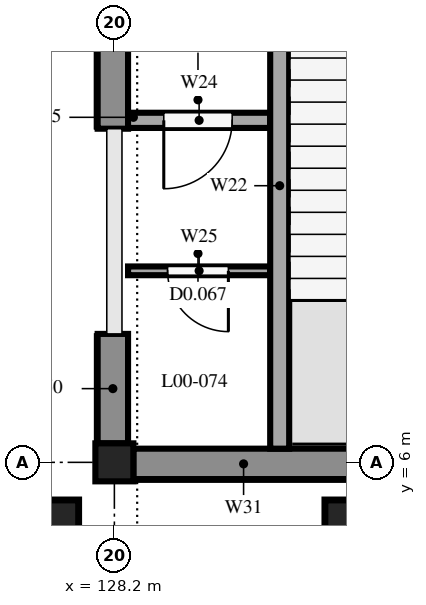
"""IFC4 building model, lengths in metres.
Left out: names, types, materials, properties, quantities, classifications, styles, units other than length and angle.
Written with IfcOpenShell. Run it as: python <this file> out.ifc"""

import sys

from ifc_helpers import new_model, si_unit, direction, frame, frame_2d, origin, origin_2d, place, context, subcontext, project, spatial, rectangle, extrude, element, fill, save


model = new_model("IFC4")
c1 = context("Model", 3, precision=1e-05, world=origin(), true_north=direction((0.0, 1.0)))
c2 = subcontext(c1, "Body", "Model", "MODEL_VIEW")
j1 = project(units=[si_unit("LENGTHUNIT", "METRE"), si_unit("PLANEANGLEUNIT", "RADIAN")], contexts=[c1])
p1 = place(None, origin())
s1 = spatial("IfcSite", under=j1, at=p1, CompositionType="ELEMENT")
p2 = place(p1, origin())
s2 = spatial("IfcBuilding", under=s1, at=p2, CompositionType="ELEMENT")
p3 = place(p2, origin())
s3 = spatial("IfcBuildingStorey", under=s2, at=p3, CompositionType="ELEMENT", Elevation=0.0)
p4 = place(p3, frame((128.2, 6.0, 0.0), z_axis=(0.0, 0.0, 1.0), x_axis=(1.0, 0.0, 0.0)))
e1 = element("IfcColumn", 1, at=p4, inside=s3, PredefinedType="COLUMN", context=c2, shape_type="SweptSolid", body=[
    extrude(rectangle(XDim=0.5, YDim=0.5, at=origin_2d()), origin(), (0.0, 0.0, 1.0), 4.25),
])
for number, where, z_axis, x_axis in (
    (2, (127.5, 5.275, -0.3), (0.0, 0.0, 1.0), (1.0, 0.0, 0.0)),
    (3, (131.2, 5.275, -0.3), (0.0, 0.0, 1.0), (1.0, 0.0, 0.0)),
):
    element("IfcColumn", number, at=place(p3, frame(where, z_axis=z_axis, x_axis=x_axis)), inside=s3, PredefinedType="COLUMN", context=c2, shape_type="SweptSolid", body=[
        extrude(rectangle(XDim=0.45, YDim=0.45, at=origin_2d()), origin(), (0.0, 0.0, 1.0), 3.95),
    ])
p5 = place(p3, frame((128.18, 6.25, 0.0), z_axis=(0.0, 0.0, 1.0), x_axis=(0.0, 1.0, 0.0)))
e4 = element("IfcWall", 4, at=p5, inside=s3, PredefinedType="STANDARD", context=c2, shape_type="SweptSolid", body=[
    extrude(rectangle(XDim=1.44, YDim=0.4, at=frame_2d((0.72, 0.0))), origin(), (0.0, 0.0, 1.0), 3.75),
])
p6 = place(p3, frame((128.18, 10.39, 0.0), z_axis=(0.0, 0.0, 1.0), x_axis=(0.0, 1.0, 0.0)))
e5 = element("IfcWall", 5, at=p6, inside=s3, PredefinedType="STANDARD", context=c2, shape_type="SweptSolid", body=[
    extrude(rectangle(XDim=4.36, YDim=0.4, at=frame_2d((2.18, 0.0))), origin(), (0.0, 0.0, 1.0), 3.75),
])
p7 = place(p6, frame((1.91, 0.0, 0.0)))
e6 = element("IfcOpeningElement", 6, at=p7, cuts=e5, PredefinedType="OPENING", context=c2, shape_type="SweptSolid", body=[
    extrude(rectangle(XDim=2.0, YDim=2.2, at=frame_2d((1.0, 1.1))), frame((0.0, 0.21, 0.0), z_axis=(0.0, -1.0, 0.0), x_axis=(1.0, 0.0, 0.0)), (0.0, 0.0, 1.0), 0.42),
])
p8 = place(p3, frame((131.35, 5.98, 0.0), z_axis=(0.0, 0.0, 1.0), x_axis=(-1.0, 0.0, 0.0)))
e7 = element("IfcWall", 7, at=p8, inside=s3, PredefinedType="STANDARD", context=c2, shape_type="SweptSolid", body=[
    extrude(rectangle(XDim=2.9, YDim=0.4, at=frame_2d((1.45, 0.0))), origin(), (0.0, 0.0, 1.0), 3.8),
])
p9 = place(p3, frame((130.375, 6.18, 0.0), z_axis=(0.0, 0.0, 1.0), x_axis=(0.0, 1.0, 0.0)))
e8 = element("IfcWall", 8, at=p9, inside=s3, PredefinedType="SOLIDWALL", context=c2, shape_type="SweptSolid", body=[
    extrude(rectangle(XDim=5.72, YDim=0.25, at=frame_2d((2.86, 0.0))), origin(), (0.0, 0.0, 1.0), 4.25),
])
p10 = place(p3, frame((130.25, 10.5, 0.0), z_axis=(0.0, 0.0, 1.0), x_axis=(-1.0, 0.0, 0.0)))
e9 = element("IfcWall", 9, at=p10, inside=s3, PredefinedType="SOLIDWALL", context=c2, shape_type="SweptSolid", body=[
    extrude(rectangle(XDim=1.87, YDim=0.2, at=frame_2d((0.935, 0.0))), origin(), (0.0, 0.0, 1.0), 4.25),
])
p11 = place(p10, frame((0.5, 0.0, 0.0)))
e10 = element("IfcOpeningElement", 10, at=p11, cuts=e9, PredefinedType="OPENING", context=c2, shape_type="SweptSolid", body=[
    extrude(rectangle(XDim=0.9, YDim=2.1, at=frame_2d((0.45, 1.05))), frame((0.0, 0.11, 0.0), z_axis=(0.0, -1.0, 0.0), x_axis=(1.0, 0.0, 0.0)), (0.0, 0.0, 1.0), 0.22),
])
p12 = place(p3, frame((130.25, 8.52, 0.0), z_axis=(0.0, 0.0, 1.0), x_axis=(-1.0, 0.0, 0.0)))
e11 = element("IfcWall", 11, at=p12, inside=s3, PredefinedType="PARTITIONING", context=c2, shape_type="SweptSolid", body=[
    extrude(rectangle(XDim=1.87, YDim=0.115, at=frame_2d((0.935, 0.0))), origin(), (0.0, 0.0, 1.0), 4.25),
])
p13 = place(p12, frame((0.55, 0.0, 0.0)))
e12 = element("IfcOpeningElement", 12, at=p13, cuts=e11, PredefinedType="OPENING", context=c2, shape_type="SweptSolid", body=[
    extrude(rectangle(XDim=0.8, YDim=2.1, at=frame_2d((0.4, 1.05))), frame((0.0, 0.067, 0.0), z_axis=(0.0, -1.0, 0.0), x_axis=(1.0, 0.0, 0.0)), (0.0, 0.0, 1.0), 0.135),
])
p14 = place(p11, origin())
e13 = element("IfcDoor", 13, at=p14, inside=s3, OperationType="SINGLE_SWING_RIGHT", PredefinedType="DOOR", context=c2, shape_type="SweptSolid", body=[
    extrude(rectangle(XDim=0.9, YDim=2.1, at=frame_2d((0.45, 1.05))), frame((0.0, 0.025, 0.0), z_axis=(0.0, -1.0, 0.0), x_axis=(1.0, 0.0, 0.0)), (0.0, 0.0, 1.0), 0.05),
])
fill(e10, e13)
p15 = place(p13, origin())
e14 = element("IfcDoor", 14, at=p15, inside=s3, OperationType="SINGLE_SWING_LEFT", PredefinedType="DOOR", context=c2, shape_type="SweptSolid", body=[
    extrude(rectangle(XDim=0.8, YDim=2.1, at=frame_2d((0.4, 1.05))), frame((0.0, 0.025, 0.0), z_axis=(0.0, -1.0, 0.0), x_axis=(1.0, 0.0, 0.0)), (0.0, 0.0, 1.0), 0.05),
])
fill(e12, e14)
save(model, sys.argv[1])
